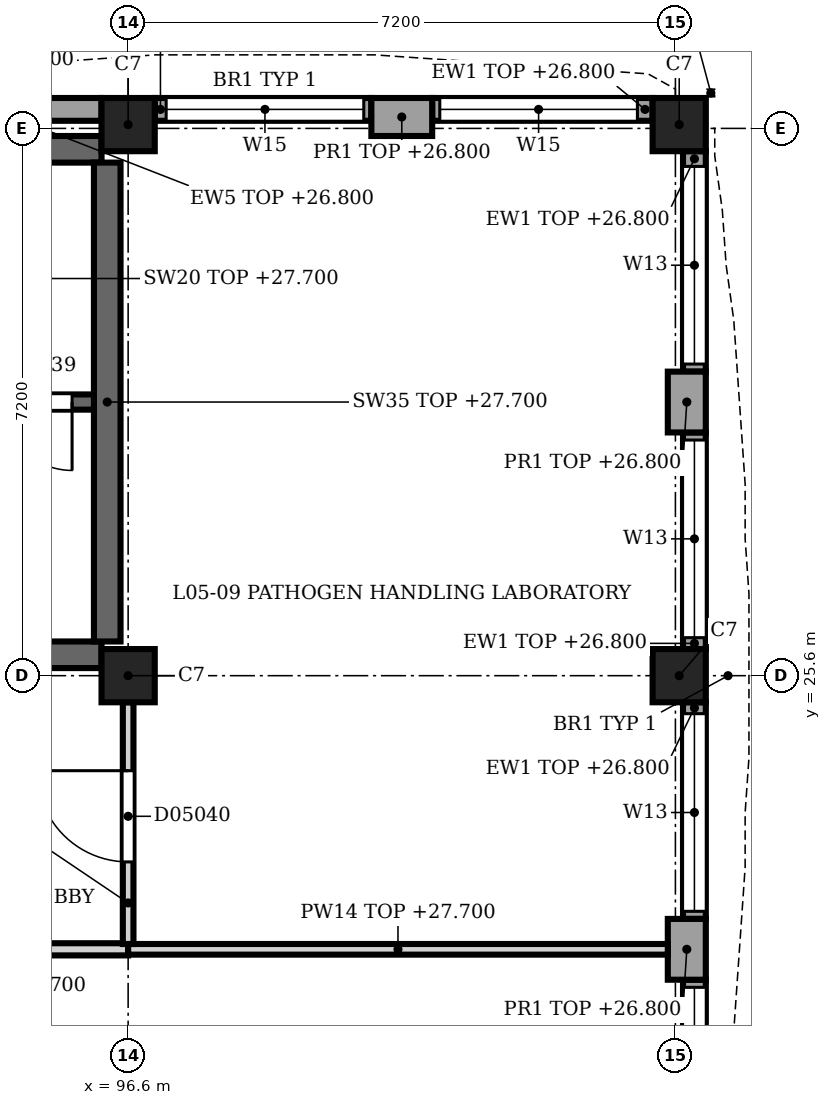
"""IFC4 building model, lengths in metres.
Left out: names, types, materials, properties, quantities, classifications, styles, units other than length and angle.
Written with IfcOpenShell. Run it as: python <this file> out.ifc"""

import sys

from ifc_helpers import new_model, si_unit, direction, frame, frame_2d, origin, origin_2d, place, context, subcontext, project, spatial, rectangle, extrude, element, fill, save


model = new_model("IFC4")
c1 = context("Model", 3, precision=1e-05, world=origin(), true_north=direction((0.0, 1.0)))
c2 = subcontext(c1, "Body", "Model", "MODEL_VIEW")
j1 = project(units=[si_unit("LENGTHUNIT", "METRE"), si_unit("PLANEANGLEUNIT", "RADIAN")], contexts=[c1])
p1 = place(None, origin())
s1 = spatial("IfcSite", under=j1, at=p1, CompositionType="ELEMENT")
p2 = place(p1, origin())
s2 = spatial("IfcBuilding", under=s1, at=p2, CompositionType="ELEMENT")
p3 = place(p2, frame((0.0, 0.0, 23.4)))
s3 = spatial("IfcBuildingStorey", under=s2, at=p3, CompositionType="ELEMENT", Elevation=23.4)
for number, where, z_axis, x_axis in (
    (1, (96.6, 25.6, 0.0), (0.0, 0.0, 1.0), (1.0, 0.0, 0.0)),
    (2, (96.6, 32.85, 0.0), (0.0, 0.0, 1.0), (1.0, 0.0, 0.0)),
    (3, (103.85, 25.6, 0.0), (0.0, 0.0, 1.0), (1.0, 0.0, 0.0)),
    (4, (103.85, 32.85, 0.0), (0.0, 0.0, 1.0), (1.0, 0.0, 0.0)),
):
    element("IfcColumn", number, at=place(p3, frame(where, z_axis=z_axis, x_axis=x_axis)), inside=s3, PredefinedType="COLUMN", context=c2, shape_type="SweptSolid", body=[
        extrude(rectangle(XDim=0.7, YDim=0.7, at=origin_2d()), origin(), (0.0, 0.0, 1.0), 4.5),
    ])
p4 = place(p3, frame((99.8, 32.95, 0.0), z_axis=(0.0, 0.0, 1.0), x_axis=(1.0, 0.0, 0.0)))
e5 = element("IfcWall", 5, at=p4, inside=s3, PredefinedType="SOLIDWALL", context=c2, shape_type="SweptSolid", body=[
    extrude(rectangle(XDim=0.8, YDim=0.5, at=frame_2d((0.4, 0.0))), origin(), (0.0, 0.0, 1.0), 3.4),
])
p5 = place(p3, frame((93.4, 33.05, 0.0), z_axis=(0.0, 0.0, 1.0), x_axis=(1.0, 0.0, 0.0)))
e6 = element("IfcWall", 6, at=p5, inside=s3, PredefinedType="SOLIDWALL", context=c2, shape_type="SweptSolid", body=[
    extrude(rectangle(XDim=2.85, YDim=0.3, at=frame_2d((1.425, 0.0))), origin(), (0.0, 0.0, 1.0), 3.4),
])
p6 = place(p3, frame((96.95, 33.05, 0.0), z_axis=(0.0, 0.0, 1.0), x_axis=(1.0, 0.0, 0.0)))
e7 = element("IfcWall", 7, at=p6, inside=s3, PredefinedType="SOLIDWALL", context=c2, shape_type="SweptSolid", body=[
    extrude(rectangle(XDim=2.85, YDim=0.3, at=frame_2d((1.425, 0.0))), origin(), (0.0, 0.0, 1.0), 3.4),
])
p7 = place(p6, frame((0.15, 0.0, 1.0)))
e8 = element("IfcOpeningElement", 8, at=p7, cuts=e7, PredefinedType="OPENING", context=c2, shape_type="SweptSolid", body=[
    extrude(rectangle(XDim=2.6, YDim=2.0, at=frame_2d((1.3, 1.0))), frame((0.0, 0.16, 0.0), z_axis=(0.0, -1.0, 0.0), x_axis=(1.0, 0.0, 0.0)), (0.0, 0.0, 1.0), 0.32),
])
p8 = place(p3, frame((100.6, 33.05, 0.0), z_axis=(0.0, 0.0, 1.0), x_axis=(1.0, 0.0, 0.0)))
e9 = element("IfcWall", 9, at=p8, inside=s3, PredefinedType="SOLIDWALL", context=c2, shape_type="SweptSolid", body=[
    extrude(rectangle(XDim=2.9, YDim=0.3, at=frame_2d((1.45, 0.0))), origin(), (0.0, 0.0, 1.0), 3.4),
])
p9 = place(p8, frame((0.1, 0.0, 1.0)))
e10 = element("IfcOpeningElement", 10, at=p9, cuts=e9, PredefinedType="OPENING", context=c2, shape_type="SweptSolid", body=[
    extrude(rectangle(XDim=2.6, YDim=2.0, at=frame_2d((1.3, 1.0))), frame((0.0, 0.16, 0.0), z_axis=(0.0, -1.0, 0.0), x_axis=(1.0, 0.0, 0.0)), (0.0, 0.0, 1.0), 0.32),
])
p10 = place(p3, frame((103.95, 29.6, 0.0), z_axis=(0.0, 0.0, 1.0), x_axis=(0.0, -1.0, 0.0)))
e11 = element("IfcWall", 11, at=p10, inside=s3, PredefinedType="SOLIDWALL", context=c2, shape_type="SweptSolid", body=[
    extrude(rectangle(XDim=0.8, YDim=0.5, at=frame_2d((0.4, 0.0))), origin(), (0.0, 0.0, 1.0), 3.4),
])
p11 = place(p3, frame((103.95, 22.4, 0.0), z_axis=(0.0, 0.0, 1.0), x_axis=(0.0, -1.0, 0.0)))
e12 = element("IfcWall", 12, at=p11, inside=s3, PredefinedType="SOLIDWALL", context=c2, shape_type="SweptSolid", body=[
    extrude(rectangle(XDim=0.8, YDim=0.5, at=frame_2d((0.4, 0.0))), origin(), (0.0, 0.0, 1.0), 3.4),
])
p12 = place(p3, frame((104.05, 32.5, 0.0), z_axis=(0.0, 0.0, 1.0), x_axis=(0.0, -1.0, 0.0)))
e13 = element("IfcWall", 13, at=p12, inside=s3, PredefinedType="SOLIDWALL", context=c2, shape_type="SweptSolid", body=[
    extrude(rectangle(XDim=2.9, YDim=0.3, at=frame_2d((1.45, 0.0))), origin(), (0.0, 0.0, 1.0), 3.4),
])
p13 = place(p12, frame((0.2, 0.0, 0.9)))
e14 = element("IfcOpeningElement", 14, at=p13, cuts=e13, PredefinedType="OPENING", context=c2, shape_type="SweptSolid", body=[
    extrude(rectangle(XDim=2.6, YDim=2.2, at=frame_2d((1.3, 1.1))), frame((0.0, 0.16, 0.0), z_axis=(0.0, -1.0, 0.0), x_axis=(1.0, 0.0, 0.0)), (0.0, 0.0, 1.0), 0.32),
])
p14 = place(p3, frame((104.05, 28.8, 0.0), z_axis=(0.0, 0.0, 1.0), x_axis=(0.0, -1.0, 0.0)))
e15 = element("IfcWall", 15, at=p14, inside=s3, PredefinedType="SOLIDWALL", context=c2, shape_type="SweptSolid", body=[
    extrude(rectangle(XDim=2.85, YDim=0.3, at=frame_2d((1.425, 0.0))), origin(), (0.0, 0.0, 1.0), 3.4),
])
p15 = place(p14, frame((0.1, 0.0, 0.9)))
e16 = element("IfcOpeningElement", 16, at=p15, cuts=e15, PredefinedType="OPENING", context=c2, shape_type="SweptSolid", body=[
    extrude(rectangle(XDim=2.6, YDim=2.2, at=frame_2d((1.3, 1.1))), frame((0.0, 0.16, 0.0), z_axis=(0.0, -1.0, 0.0), x_axis=(1.0, 0.0, 0.0)), (0.0, 0.0, 1.0), 0.32),
])
p16 = place(p3, frame((104.05, 25.25, 0.0), z_axis=(0.0, 0.0, 1.0), x_axis=(0.0, -1.0, 0.0)))
e17 = element("IfcWall", 17, at=p16, inside=s3, PredefinedType="SOLIDWALL", context=c2, shape_type="SweptSolid", body=[
    extrude(rectangle(XDim=2.85, YDim=0.3, at=frame_2d((1.425, 0.0))), origin(), (0.0, 0.0, 1.0), 3.4),
])
p17 = place(p16, frame((0.15, 0.0, 0.9)))
e18 = element("IfcOpeningElement", 18, at=p17, cuts=e17, PredefinedType="OPENING", context=c2, shape_type="SweptSolid", body=[
    extrude(rectangle(XDim=2.6, YDim=2.2, at=frame_2d((1.3, 1.1))), frame((0.0, 0.16, 0.0), z_axis=(0.0, -1.0, 0.0), x_axis=(1.0, 0.0, 0.0)), (0.0, 0.0, 1.0), 0.32),
])
p18 = place(p3, frame((104.05, 21.6, 0.0), z_axis=(0.0, 0.0, 1.0), x_axis=(0.0, -1.0, 0.0)))
e19 = element("IfcWall", 19, at=p18, inside=s3, PredefinedType="SOLIDWALL", context=c2, shape_type="SweptSolid", body=[
    extrude(rectangle(XDim=2.85, YDim=0.3, at=frame_2d((1.425, 0.0))), origin(), (0.0, 0.0, 1.0), 3.4),
])
p19 = place(p18, frame((0.1, 0.0, 0.9)))
e20 = element("IfcOpeningElement", 20, at=p19, cuts=e19, PredefinedType="OPENING", context=c2, shape_type="SweptSolid", body=[
    extrude(rectangle(XDim=2.6, YDim=2.2, at=frame_2d((1.3, 1.1))), frame((0.0, 0.16, 0.0), z_axis=(0.0, -1.0, 0.0), x_axis=(1.0, 0.0, 0.0)), (0.0, 0.0, 1.0), 0.32),
])
p20 = place(p3, frame((89.75, 25.875, 0.0), z_axis=(0.0, 0.0, 1.0), x_axis=(1.0, 0.0, 0.0)))
e21 = element("IfcWall", 21, at=p20, inside=s3, PredefinedType="SHEAR", context=c2, shape_type="SweptSolid", body=[
    extrude(rectangle(XDim=6.5, YDim=0.35, at=frame_2d((3.25, 0.0))), origin(), (0.0, 0.0, 1.0), 4.3),
])
p21 = place(p20, frame((2.65, 0.0, 0.0)))
e22 = element("IfcOpeningElement", 22, at=p21, cuts=e21, PredefinedType="OPENING", context=c2, shape_type="SweptSolid", body=[
    extrude(rectangle(XDim=1.8, YDim=2.1, at=frame_2d((0.9, 1.05))), frame((0.0, 0.185, 0.0), z_axis=(0.0, -1.0, 0.0), x_axis=(1.0, 0.0, 0.0)), (0.0, 0.0, 1.0), 0.37),
])
p22 = place(p3, frame((89.75, 32.525, 0.0), z_axis=(0.0, 0.0, 1.0), x_axis=(1.0, 0.0, 0.0)))
e23 = element("IfcWall", 23, at=p22, inside=s3, PredefinedType="SHEAR", context=c2, shape_type="SweptSolid", body=[
    extrude(rectangle(XDim=6.5, YDim=0.35, at=frame_2d((3.25, 0.0))), origin(), (0.0, 0.0, 1.0), 4.3),
])
p23 = place(p3, frame((96.325, 26.05, 0.0), z_axis=(0.0, 0.0, 1.0), x_axis=(0.0, 1.0, 0.0)))
e24 = element("IfcWall", 24, at=p23, inside=s3, PredefinedType="SHEAR", context=c2, shape_type="SweptSolid", body=[
    extrude(rectangle(XDim=6.3, YDim=0.35, at=frame_2d((3.15, 0.0))), origin(), (0.0, 0.0, 1.0), 4.3),
])
p24 = place(p3, frame((96.15, 29.2, 0.0), z_axis=(0.0, 0.0, 1.0), x_axis=(-1.0, 0.0, 0.0)))
e25 = element("IfcWall", 25, at=p24, inside=s3, PredefinedType="SHEAR", context=c2, shape_type="SweptSolid", body=[
    extrude(rectangle(XDim=10.35, YDim=0.2, at=frame_2d((5.175, 0.0))), origin(), (0.0, 0.0, 1.0), 4.3),
])
p25 = place(p24, frame((8.8, 0.0, 0.0)))
e26 = element("IfcOpeningElement", 26, at=p25, cuts=e25, PredefinedType="OPENING", context=c2, shape_type="SweptSolid", body=[
    extrude(rectangle(XDim=1.1, YDim=2.1, at=frame_2d((0.55, 1.05))), frame((0.0, 0.11, 0.0), z_axis=(0.0, -1.0, 0.0), x_axis=(1.0, 0.0, 0.0)), (0.0, 0.0, 1.0), 0.22),
])
p26 = place(p24, frame((6.6, 0.0, 0.0)))
e27 = element("IfcOpeningElement", 27, at=p26, cuts=e25, PredefinedType="OPENING", context=c2, shape_type="SweptSolid", body=[
    extrude(rectangle(XDim=1.1, YDim=2.1, at=frame_2d((0.55, 1.05))), frame((0.0, 0.11, 0.0), z_axis=(0.0, -1.0, 0.0), x_axis=(1.0, 0.0, 0.0)), (0.0, 0.0, 1.0), 0.22),
])
p27 = place(p24, frame((3.75, 0.0, 0.0)))
e28 = element("IfcOpeningElement", 28, at=p27, cuts=e25, PredefinedType="OPENING", context=c2, shape_type="SweptSolid", body=[
    extrude(rectangle(XDim=1.4, YDim=2.1, at=frame_2d((0.7, 1.05))), frame((0.0, 0.11, 0.0), z_axis=(0.0, -1.0, 0.0), x_axis=(1.0, 0.0, 0.0)), (0.0, 0.0, 1.0), 0.22),
])
p28 = place(p24, frame((1.962, 0.0, 0.0)))
e29 = element("IfcOpeningElement", 29, at=p28, cuts=e25, PredefinedType="OPENING", context=c2, shape_type="SweptSolid", body=[
    extrude(rectangle(XDim=0.9, YDim=2.1, at=frame_2d((0.45, 1.05))), frame((0.0, 0.11, 0.0), z_axis=(0.0, -1.0, 0.0), x_axis=(1.0, 0.0, 0.0)), (0.0, 0.0, 1.0), 0.22),
])
p29 = place(p24, frame((0.288, 0.0, 0.0)))
e30 = element("IfcOpeningElement", 30, at=p29, cuts=e25, PredefinedType="OPENING", context=c2, shape_type="SweptSolid", body=[
    extrude(rectangle(XDim=0.9, YDim=2.1, at=frame_2d((0.45, 1.05))), frame((0.0, 0.11, 0.0), z_axis=(0.0, -1.0, 0.0), x_axis=(1.0, 0.0, 0.0)), (0.0, 0.0, 1.0), 0.22),
])
p30 = place(p3, frame((92.92, 22.0, 0.0), z_axis=(0.0, 0.0, 1.0), x_axis=(1.0, 0.0, 0.0)))
e31 = element("IfcWall", 31, at=p30, inside=s3, PredefinedType="PARTITIONING", context=c2, shape_type="SweptSolid", body=[
    extrude(rectangle(XDim=3.68, YDim=0.16, at=frame_2d((1.84, 0.0))), origin(), (0.0, 0.0, 1.0), 4.3),
])
p31 = place(p3, frame((96.6, 22.0, 0.0), z_axis=(0.0, 0.0, 1.0), x_axis=(1.0, 0.0, 0.0)))
e32 = element("IfcWall", 32, at=p31, inside=s3, PredefinedType="PARTITIONING", context=c2, shape_type="SweptSolid", body=[
    extrude(rectangle(XDim=7.1, YDim=0.14, at=frame_2d((3.55, 0.0))), origin(), (0.0, 0.0, 1.0), 4.3),
])
p32 = place(p3, frame((96.6, 25.25, 0.0), z_axis=(0.0, 0.0, 1.0), x_axis=(0.0, -1.0, 0.0)))
e33 = element("IfcWall", 33, at=p32, inside=s3, PredefinedType="PARTITIONING", context=c2, shape_type="SweptSolid", body=[
    extrude(rectangle(XDim=3.18, YDim=0.14, at=frame_2d((1.59, 0.0))), origin(), (0.0, 0.0, 1.0), 3.47),
])
p33 = place(p32, frame((0.9, 0.0, 0.0)))
e34 = element("IfcOpeningElement", 34, at=p33, cuts=e33, PredefinedType="OPENING", context=c2, shape_type="SweptSolid", body=[
    extrude(rectangle(XDim=1.2, YDim=2.2, at=frame_2d((0.6, 1.1))), frame((0.0, 0.08, 0.0), z_axis=(0.0, -1.0, 0.0), x_axis=(1.0, 0.0, 0.0)), (0.0, 0.0, 1.0), 0.16),
])
p34 = place(p7, origin())
e35 = element("IfcWindow", 35, at=p34, inside=s3, PartitioningType="SINGLE_PANEL", PredefinedType="WINDOW", context=c2, shape_type="SweptSolid", body=[
    extrude(rectangle(XDim=2.6, YDim=2.0, at=frame_2d((1.3, 1.0))), frame((0.0, 0.03, 0.0), z_axis=(0.0, -1.0, 0.0), x_axis=(1.0, 0.0, 0.0)), (0.0, 0.0, 1.0), 0.06),
])
fill(e8, e35)
p35 = place(p9, origin())
e36 = element("IfcWindow", 36, at=p35, inside=s3, PartitioningType="SINGLE_PANEL", PredefinedType="WINDOW", context=c2, shape_type="SweptSolid", body=[
    extrude(rectangle(XDim=2.6, YDim=2.0, at=frame_2d((1.3, 1.0))), frame((0.0, 0.03, 0.0), z_axis=(0.0, -1.0, 0.0), x_axis=(1.0, 0.0, 0.0)), (0.0, 0.0, 1.0), 0.06),
])
fill(e10, e36)
p36 = place(p13, origin())
e37 = element("IfcWindow", 37, at=p36, inside=s3, PartitioningType="SINGLE_PANEL", PredefinedType="WINDOW", context=c2, shape_type="SweptSolid", body=[
    extrude(rectangle(XDim=2.6, YDim=2.2, at=frame_2d((1.3, 1.1))), frame((0.0, 0.03, 0.0), z_axis=(0.0, -1.0, 0.0), x_axis=(1.0, 0.0, 0.0)), (0.0, 0.0, 1.0), 0.06),
])
fill(e14, e37)
p37 = place(p15, origin())
e38 = element("IfcWindow", 38, at=p37, inside=s3, PartitioningType="SINGLE_PANEL", PredefinedType="WINDOW", context=c2, shape_type="SweptSolid", body=[
    extrude(rectangle(XDim=2.6, YDim=2.2, at=frame_2d((1.3, 1.1))), frame((0.0, 0.03, 0.0), z_axis=(0.0, -1.0, 0.0), x_axis=(1.0, 0.0, 0.0)), (0.0, 0.0, 1.0), 0.06),
])
fill(e16, e38)
p38 = place(p17, origin())
e39 = element("IfcWindow", 39, at=p38, inside=s3, PartitioningType="SINGLE_PANEL", PredefinedType="WINDOW", context=c2, shape_type="SweptSolid", body=[
    extrude(rectangle(XDim=2.6, YDim=2.2, at=frame_2d((1.3, 1.1))), frame((0.0, 0.03, 0.0), z_axis=(0.0, -1.0, 0.0), x_axis=(1.0, 0.0, 0.0)), (0.0, 0.0, 1.0), 0.06),
])
fill(e18, e39)
p39 = place(p19, origin())
e40 = element("IfcWindow", 40, at=p39, inside=s3, PartitioningType="SINGLE_PANEL", PredefinedType="WINDOW", context=c2, shape_type="SweptSolid", body=[
    extrude(rectangle(XDim=2.6, YDim=2.2, at=frame_2d((1.3, 1.1))), frame((0.0, 0.03, 0.0), z_axis=(0.0, -1.0, 0.0), x_axis=(1.0, 0.0, 0.0)), (0.0, 0.0, 1.0), 0.06),
])
fill(e20, e40)
p40 = place(p29, origin())
e41 = element("IfcDoor", 41, at=p40, inside=s3, OperationType="SINGLE_SWING_LEFT", PredefinedType="DOOR", context=c2, shape_type="SweptSolid", body=[
    extrude(rectangle(XDim=0.9, YDim=2.1, at=frame_2d((0.45, 1.05))), frame((0.0, 0.025, 0.0), z_axis=(0.0, -1.0, 0.0), x_axis=(1.0, 0.0, 0.0)), (0.0, 0.0, 1.0), 0.05),
])
fill(e30, e41)
p41 = place(p33, origin())
e42 = element("IfcDoor", 42, at=p41, inside=s3, OperationType="SINGLE_SWING_LEFT", PredefinedType="DOOR", context=c2, shape_type="SweptSolid", body=[
    extrude(rectangle(XDim=1.2, YDim=2.2, at=frame_2d((0.6, 1.1))), frame((0.0, 0.025, 0.0), z_axis=(0.0, -1.0, 0.0), x_axis=(1.0, 0.0, 0.0)), (0.0, 0.0, 1.0), 0.05),
])
fill(e34, e42)
save(model, sys.argv[1])
